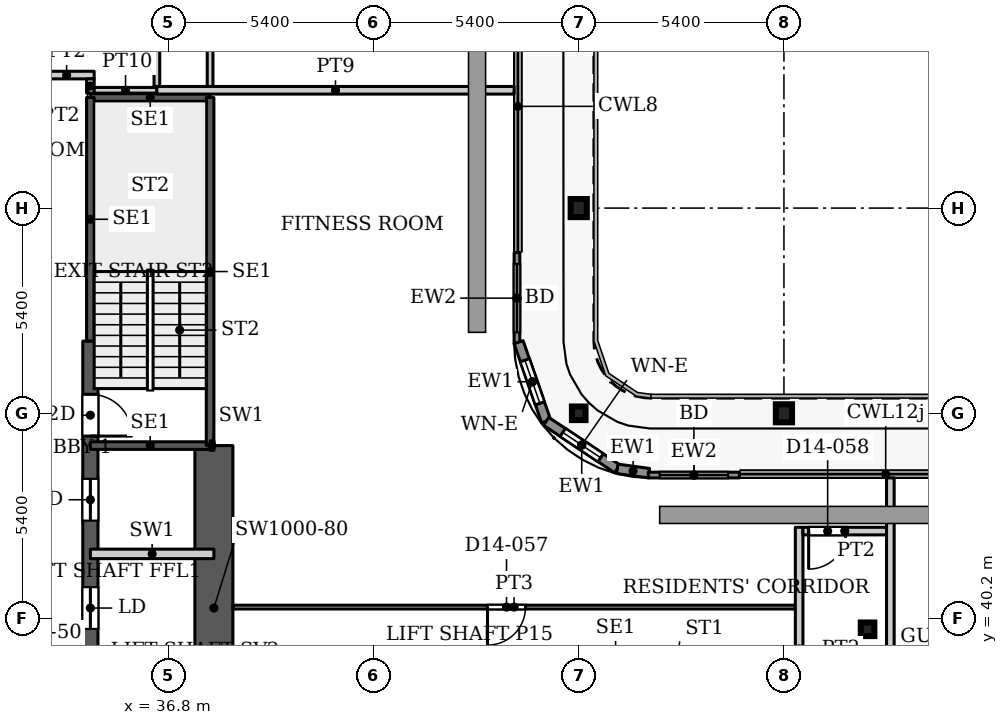
"""IFC4 building model, lengths in metres.
Left out: names, types, materials, properties, quantities, classifications, styles, units other than length and angle.
Written with IfcOpenShell. Run it as: python <this file> out.ifc"""

import sys

from ifc_helpers import new_model, si_unit, direction, frame, frame_2d, origin, origin_2d, place, context, subcontext, project, spatial, rectangle, hollow_rectangle, i_section, extrude, source, transform, mapped, element, fill, save


model = new_model("IFC4")
c1 = context("Model", 3, precision=1e-05, world=origin(), true_north=direction((0.0, 1.0)))
c2 = subcontext(c1, "Body", "Model", "MODEL_VIEW")
j1 = project(units=[si_unit("LENGTHUNIT", "METRE"), si_unit("PLANEANGLEUNIT", "RADIAN")], contexts=[c1])
p1 = place(None, origin())
s1 = spatial("IfcSite", under=j1, at=p1, CompositionType="ELEMENT")
p2 = place(p1, origin())
s2 = spatial("IfcBuilding", under=s1, at=p2, CompositionType="ELEMENT")
p3 = place(p2, frame((0.0, 0.0, 69.5)))
s3 = spatial("IfcBuildingStorey", under=s2, at=p3, CompositionType="ELEMENT", Elevation=69.5)
for number, where, z_axis, x_axis in (
    (1, (53.0, 45.6, 0.0), (0.0, 0.0, 1.0), (1.0, 0.0, 0.0)),
    (2, (47.6, 51.0, 0.0), (0.0, 0.0, 1.0), (1.0, 0.0, 0.0)),
):
    element("IfcColumn", number, at=place(p3, frame(where, z_axis=z_axis, x_axis=x_axis)), inside=s3, PredefinedType="COLUMN", context=c2, shape_type="SweptSolid", body=[
        extrude(i_section(OverallWidth=0.424, OverallDepth=0.474, WebThickness=0.048, FlangeThickness=0.077, FilletRadius=0.014, at=origin_2d()), origin(), (0.0, 0.0, 1.0), 3.9),
    ])
for number, where, z_axis, x_axis in (
    (3, (55.2, 39.916, 0.0), (0.0, 0.0, 1.0), (1.0, 0.0, 0.0)),
    (4, (47.6, 45.6, 0.0), (0.0, 0.0, 1.0), (1.0, 0.0, 0.0)),
):
    element("IfcColumn", number, at=place(p3, frame(where, z_axis=z_axis, x_axis=x_axis)), inside=s3, PredefinedType="COLUMN", context=c2, shape_type="SweptSolid", body=[
        extrude(hollow_rectangle(XDim=0.356, YDim=0.356, WallThickness=0.016, InnerFilletRadius=0.016, OuterFilletRadius=0.032, at=origin_2d()), origin(), (0.0, 0.0, 1.0), 3.9),
    ])
p4 = place(p3, frame((34.75, 29.05, 0.0), z_axis=(0.0, 0.0, 1.0), x_axis=(0.0, 1.0, 0.0)))
e5 = element("IfcWall", 5, at=p4, inside=s3, PredefinedType="SHEAR", context=c2, shape_type="SweptSolid", body=[
    extrude(rectangle(XDim=18.45, YDim=0.4, at=frame_2d((9.225, 0.0))), origin(), (0.0, 0.0, 1.0), 3.9),
])
p5 = place(p4, frame((8.025, 0.0, 0.0)))
e6 = element("IfcOpeningElement", 6, at=p5, cuts=e5, PredefinedType="OPENING", context=c2, shape_type="SweptSolid", body=[
    extrude(rectangle(XDim=1.1, YDim=2.2, at=frame_2d((0.55, 1.1))), frame((0.0, 0.21, 0.0), z_axis=(0.0, -1.0, 0.0), x_axis=(1.0, 0.0, 0.0)), (0.0, 0.0, 1.0), 0.42),
])
p6 = place(p4, frame((10.875, 0.0, 0.0)))
e7 = element("IfcOpeningElement", 7, at=p6, cuts=e5, PredefinedType="OPENING", context=c2, shape_type="SweptSolid", body=[
    extrude(rectangle(XDim=1.1, YDim=2.2, at=frame_2d((0.55, 1.1))), frame((0.0, 0.21, 0.0), z_axis=(0.0, -1.0, 0.0), x_axis=(1.0, 0.0, 0.0)), (0.0, 0.0, 1.0), 0.42),
])
p7 = place(p4, frame((13.725, 0.0, 0.0)))
e8 = element("IfcOpeningElement", 8, at=p7, cuts=e5, PredefinedType="OPENING", context=c2, shape_type="SweptSolid", body=[
    extrude(rectangle(XDim=1.1, YDim=2.2, at=frame_2d((0.55, 1.1))), frame((0.0, 0.21, 0.0), z_axis=(0.0, -1.0, 0.0), x_axis=(1.0, 0.0, 0.0)), (0.0, 0.0, 1.0), 0.42),
])
p8 = place(p4, frame((15.95, 0.0, 0.0)))
e9 = element("IfcOpeningElement", 9, at=p8, cuts=e5, PredefinedType="OPENING", context=c2, shape_type="SweptSolid", body=[
    extrude(rectangle(XDim=1.1, YDim=2.2, at=frame_2d((0.55, 1.1))), frame((0.0, 0.21, 0.0), z_axis=(0.0, -1.0, 0.0), x_axis=(1.0, 0.0, 0.0)), (0.0, 0.0, 1.0), 0.42),
])
p9 = place(p3, frame((38.0, 36.2, 0.0), z_axis=(0.0, 0.0, 1.0), x_axis=(0.0, 1.0, 0.0)))
e10 = element("IfcWall", 10, at=p9, inside=s3, PredefinedType="SHEAR", context=c2, shape_type="SweptSolid", body=[
    extrude(rectangle(XDim=8.55, YDim=1.0, at=frame_2d((4.275, 0.0))), origin(), (0.0, 0.0, 1.0), 3.9),
])
p10 = place(p3, frame((45.975, 49.83, 0.0), z_axis=(0.0, 0.0, 1.0), x_axis=(0.0, -1.0, 0.0)))
e11 = element("IfcWall", 11, at=p10, inside=s3, PredefinedType="SOLIDWALL", context=c2, shape_type="SweptSolid", body=[
    extrude(rectangle(XDim=2.4, YDim=0.15, at=frame_2d((1.2, 0.0))), origin(), (0.0, 0.0, 1.0), 3.75),
])
p11 = place(p10, frame((0.3, 0.0, 0.0)))
e12 = element("IfcOpeningElement", 12, at=p11, cuts=e11, PredefinedType="OPENING", context=c2, shape_type="SweptSolid", body=[
    extrude(rectangle(XDim=1.8, YDim=2.4, at=frame_2d((0.9, 1.2))), frame((0.0, 0.085, 0.0), z_axis=(0.0, -1.0, 0.0), x_axis=(1.0, 0.0, 0.0)), (0.0, 0.0, 1.0), 0.17),
])
p12 = place(p3, frame((46.018, 47.471, 0.0), z_axis=(0.0, 0.0, 1.0), x_axis=(0.328791208903, -0.944402637093, 0.0)))
e13 = element("IfcWall", 13, at=p12, inside=s3, PredefinedType="SOLIDWALL", context=c2, shape_type="SweptSolid", body=[
    extrude(rectangle(XDim=2.205, YDim=0.25, at=frame_2d((1.102, 0.0))), origin(), (0.0, 0.0, 1.0), 3.75),
])
p13 = place(p12, frame((0.503, 0.0, 0.6)))
e14 = element("IfcOpeningElement", 14, at=p13, cuts=e13, PredefinedType="OPENING", context=c2, shape_type="SweptSolid", body=[
    extrude(rectangle(XDim=1.2, YDim=2.1, at=frame_2d((0.6, 1.05))), frame((0.0, 0.135, 0.0), z_axis=(0.0, -1.0, 0.0), x_axis=(1.0, 0.0, 0.0)), (0.0, 0.0, 1.0), 0.27),
])
p14 = place(p3, frame((46.743, 45.389, 0.0), z_axis=(0.0, 0.0, 1.0), x_axis=(0.831449265529, -0.555600682912, 0.0)))
e15 = element("IfcWall", 15, at=p14, inside=s3, PredefinedType="SOLIDWALL", context=c2, shape_type="SweptSolid", body=[
    extrude(rectangle(XDim=2.251, YDim=0.25, at=frame_2d((1.126, 0.0))), origin(), (0.0, 0.0, 1.0), 3.75),
])
p15 = place(p14, frame((0.525, 0.0, 0.6)))
e16 = element("IfcOpeningElement", 16, at=p15, cuts=e15, PredefinedType="OPENING", context=c2, shape_type="SweptSolid", body=[
    extrude(rectangle(XDim=1.2, YDim=2.1, at=frame_2d((0.6, 1.05))), frame((0.0, 0.135, 0.0), z_axis=(0.0, -1.0, 0.0), x_axis=(1.0, 0.0, 0.0)), (0.0, 0.0, 1.0), 0.27),
])
p16 = place(p3, frame((48.615, 44.138, 0.0), z_axis=(0.0, 0.0, 1.0), x_axis=(0.990741504246, -0.135761819977, 0.0)))
e17 = element("IfcWall", 17, at=p16, inside=s3, PredefinedType="SOLIDWALL", context=c2, shape_type="SweptSolid", body=[
    extrude(rectangle(XDim=0.84, YDim=0.25, at=frame_2d((0.42, 0.0))), origin(), (0.0, 0.0, 1.0), 3.75),
])
p17 = place(p3, frame((49.43, 43.975, 0.0), z_axis=(0.0, 0.0, 1.0), x_axis=(1.0, 0.0, 0.0)))
e18 = element("IfcWall", 18, at=p17, inside=s3, PredefinedType="SOLIDWALL", context=c2, shape_type="SweptSolid", body=[
    extrude(rectangle(XDim=2.4, YDim=0.15, at=frame_2d((1.2, 0.0))), origin(), (0.0, 0.0, 1.0), 3.75),
])
p18 = place(p17, frame((0.3, 0.0, 0.0)))
e19 = element("IfcOpeningElement", 19, at=p18, cuts=e18, PredefinedType="OPENING", context=c2, shape_type="SweptSolid", body=[
    extrude(rectangle(XDim=1.8, YDim=2.4, at=frame_2d((0.9, 1.2))), frame((0.0, 0.085, 0.0), z_axis=(0.0, -1.0, 0.0), x_axis=(1.0, 0.0, 0.0)), (0.0, 0.0, 1.0), 0.17),
])
for number, where, z_axis, x_axis in (
    (20, (34.75, 44.75, 0.0), (0.0, 0.0, 1.0), (1.0, 0.0, 0.0)),
    (21, (34.75, 53.91, 0.0), (0.0, 0.0, 1.0), (1.0, 0.0, 0.0)),
):
    element("IfcWall", number, at=place(p3, frame(where, z_axis=z_axis, x_axis=x_axis)), inside=s3, PredefinedType="SHEAR", context=c2, shape_type="SweptSolid", body=[
        extrude(rectangle(XDim=3.15, YDim=0.2, at=frame_2d((1.575, 0.0))), origin(), (0.0, 0.0, 1.0), 3.9),
    ])
p19 = place(p3, frame((34.75, 47.5, 0.0), z_axis=(0.0, 0.0, 1.0), x_axis=(0.0, 1.0, 0.0)))
e22 = element("IfcWall", 22, at=p19, inside=s3, PredefinedType="SHEAR", context=c2, shape_type="SweptSolid", body=[
    extrude(rectangle(XDim=6.41, YDim=0.2, at=frame_2d((3.205, 0.0))), origin(), (0.0, 0.0, 1.0), 3.9),
])
p20 = place(p3, frame((37.9, 44.75, 0.0), z_axis=(0.0, 0.0, 1.0), x_axis=(0.0, 1.0, 0.0)))
e23 = element("IfcWall", 23, at=p20, inside=s3, PredefinedType="SHEAR", context=c2, shape_type="SweptSolid", body=[
    extrude(rectangle(XDim=9.16, YDim=0.2, at=frame_2d((4.58, 0.0))), origin(), (0.0, 0.0, 1.0), 3.9),
])
p21 = place(p3, frame((34.75, 41.9, 0.0), z_axis=(0.0, 0.0, 1.0), x_axis=(1.0, 0.0, 0.0)))
e24 = element("IfcWall", 24, at=p21, inside=s3, PredefinedType="PARTITIONING", context=c2, shape_type="SweptSolid", body=[
    extrude(rectangle(XDim=3.25, YDim=0.25, at=frame_2d((1.625, 0.0))), origin(), (0.0, 0.0, 1.0), 3.9),
])
p22 = place(p3, frame((37.9, 44.75, 0.0), z_axis=(0.0, 0.0, 1.0), x_axis=(1.0, 0.0, 0.0)))
e25 = element("IfcWall", 25, at=p22, inside=s3, PredefinedType="PARTITIONING", context=c2, shape_type="SweptSolid", body=[
    extrude(rectangle(XDim=0.1, YDim=0.25, at=frame_2d((0.05, 0.0))), origin(), (0.0, 0.0, 1.0), 3.9),
])
p23 = place(p3, frame((33.4, 54.5, 0.0), z_axis=(0.0, 0.0, 1.0), x_axis=(1.0, 0.0, 0.0)))
e26 = element("IfcWall", 26, at=p23, inside=s3, PredefinedType="PARTITIONING", context=c2, shape_type="SweptSolid", body=[
    extrude(rectangle(XDim=1.45, YDim=0.2, at=frame_2d((0.725, 0.0))), origin(), (0.0, 0.0, 1.0), 3.6),
])
p24 = place(p3, frame((34.75, 54.025, 0.0), z_axis=(0.0, 0.0, 1.0), x_axis=(0.0, 1.0, 0.0)))
e27 = element("IfcWall", 27, at=p24, inside=s3, PredefinedType="PARTITIONING", context=c2, shape_type="SweptSolid", body=[
    extrude(rectangle(XDim=0.375, YDim=0.2, at=frame_2d((0.188, 0.0))), origin(), (0.0, 0.0, 1.0), 3.6),
])
p25 = place(p3, frame((34.85, 54.1, 0.0), z_axis=(0.0, 0.0, 1.0), x_axis=(1.0, 0.0, 0.0)))
e28 = element("IfcWall", 28, at=p25, inside=s3, PredefinedType="PARTITIONING", context=c2, shape_type="SweptSolid", body=[
    extrude(rectangle(XDim=1.65, YDim=0.15, at=frame_2d((0.825, 0.0))), origin(), (0.0, 0.0, 1.0), 3.6),
])
p26 = place(p3, frame((36.5, 54.1, 0.0), z_axis=(0.0, 0.0, 1.0), x_axis=(1.0, 0.0, 0.0)))
e29 = element("IfcWall", 29, at=p26, inside=s3, PredefinedType="PARTITIONING", context=c2, shape_type="SweptSolid", body=[
    extrude(rectangle(XDim=9.4, YDim=0.2, at=frame_2d((4.7, 0.0))), origin(), (0.0, 0.0, 1.0), 3.6),
])
p27 = place(p3, frame((36.5, 54.2, 0.0), z_axis=(0.0, 0.0, 1.0), x_axis=(0.0, 1.0, 0.0)))
e30 = element("IfcWall", 30, at=p27, inside=s3, PredefinedType="PARTITIONING", context=c2, shape_type="SweptSolid", body=[
    extrude(rectangle(XDim=2.825, YDim=0.15, at=frame_2d((1.413, 0.0))), origin(), (0.0, 0.0, 1.0), 3.6),
])
p28 = place(p27, frame((1.0, 0.0, 0.0)))
e31 = element("IfcOpeningElement", 31, at=p28, cuts=e30, PredefinedType="OPENING", context=c2, shape_type="SweptSolid", body=[
    extrude(rectangle(XDim=0.8, YDim=2.1, at=frame_2d((0.4, 1.05))), frame((0.0, 0.085, 0.0), z_axis=(0.0, -1.0, 0.0), x_axis=(1.0, 0.0, 0.0)), (0.0, 0.0, 1.0), 0.17),
])
p29 = place(p3, frame((37.9, 54.2, 0.0), z_axis=(0.0, 0.0, 1.0), x_axis=(0.0, 1.0, 0.0)))
e32 = element("IfcWall", 32, at=p29, inside=s3, PredefinedType="PARTITIONING", context=c2, shape_type="SweptSolid", body=[
    extrude(rectangle(XDim=25.05, YDim=0.15, at=frame_2d((12.525, 0.0))), origin(), (0.0, 0.0, 1.0), 3.6),
])
p30 = place(p29, frame((5.6, 0.0, 0.0)))
e33 = element("IfcOpeningElement", 33, at=p30, cuts=e32, PredefinedType="OPENING", context=c2, shape_type="SweptSolid", body=[
    extrude(rectangle(XDim=0.9, YDim=2.1, at=frame_2d((0.45, 1.05))), frame((0.0, 0.085, 0.0), z_axis=(0.0, -1.0, 0.0), x_axis=(1.0, 0.0, 0.0)), (0.0, 0.0, 1.0), 0.17),
])
p31 = place(p29, frame((14.9, 0.0, 0.0)))
e34 = element("IfcOpeningElement", 34, at=p31, cuts=e32, PredefinedType="OPENING", context=c2, shape_type="SweptSolid", body=[
    extrude(rectangle(XDim=0.9, YDim=2.1, at=frame_2d((0.45, 1.05))), frame((0.0, 0.085, 0.0), z_axis=(0.0, -1.0, 0.0), x_axis=(1.0, 0.0, 0.0)), (0.0, 0.0, 1.0), 0.17),
])
p32 = place(p29, frame((18.65, 0.0, 0.0)))
e35 = element("IfcOpeningElement", 35, at=p32, cuts=e32, PredefinedType="OPENING", context=c2, shape_type="SweptSolid", body=[
    extrude(rectangle(XDim=0.9, YDim=2.1, at=frame_2d((0.45, 1.05))), frame((0.0, 0.085, 0.0), z_axis=(0.0, -1.0, 0.0), x_axis=(1.0, 0.0, 0.0)), (0.0, 0.0, 1.0), 0.17),
])
p33 = place(p29, frame((22.5, 0.0, 0.0)))
e36 = element("IfcOpeningElement", 36, at=p33, cuts=e32, PredefinedType="OPENING", context=c2, shape_type="SweptSolid", body=[
    extrude(rectangle(XDim=1.0, YDim=2.1, at=frame_2d((0.5, 1.05))), frame((0.0, 0.085, 0.0), z_axis=(0.0, -1.0, 0.0), x_axis=(1.0, 0.0, 0.0)), (0.0, 0.0, 1.0), 0.17),
])
p34 = place(p29, frame((1.2, 0.0, 0.0)))
e37 = element("IfcOpeningElement", 37, at=p34, cuts=e32, PredefinedType="OPENING", context=c2, shape_type="SweptSolid", body=[
    extrude(rectangle(XDim=1.6, YDim=2.1, at=frame_2d((0.8, 1.05))), frame((0.0, 0.085, 0.0), z_axis=(0.0, -1.0, 0.0), x_axis=(1.0, 0.0, 0.0)), (0.0, 0.0, 1.0), 0.17),
])
p35 = place(p29, frame((11.3, 0.0, 0.0)))
e38 = element("IfcOpeningElement", 38, at=p35, cuts=e32, PredefinedType="OPENING", context=c2, shape_type="SweptSolid", body=[
    extrude(rectangle(XDim=0.9, YDim=2.1, at=frame_2d((0.45, 1.05))), frame((0.0, 0.085, 0.0), z_axis=(0.0, -1.0, 0.0), x_axis=(1.0, 0.0, 0.0)), (0.0, 0.0, 1.0), 0.17),
])
p36 = place(p3, frame((38.499, 40.5, 0.0), z_axis=(0.0, 0.0, 1.0), x_axis=(1.0, 0.0, 0.0)))
e39 = element("IfcWall", 39, at=p36, inside=s3, PredefinedType="PARTITIONING", context=c2, shape_type="SweptSolid", body=[
    extrude(rectangle(XDim=14.801, YDim=0.1, at=frame_2d((7.4, 0.0))), origin(), (0.0, 0.0, 1.0), 3.6),
])
p37 = place(p36, frame((6.701, 0.0, 0.0)))
e40 = element("IfcOpeningElement", 40, at=p37, cuts=e39, PredefinedType="OPENING", context=c2, shape_type="SweptSolid", body=[
    extrude(rectangle(XDim=1.0, YDim=2.1, at=frame_2d((0.5, 1.05))), frame((0.0, 0.06, 0.0), z_axis=(0.0, -1.0, 0.0), x_axis=(1.0, 0.0, 0.0)), (0.0, 0.0, 1.0), 0.12),
])
p38 = place(p3, frame((53.4, 36.199, 0.0), z_axis=(0.0, 0.0, 1.0), x_axis=(0.0, 1.0, 0.0)))
e41 = element("IfcWall", 41, at=p38, inside=s3, PredefinedType="PARTITIONING", context=c2, shape_type="SweptSolid", body=[
    extrude(rectangle(XDim=6.401, YDim=0.2, at=frame_2d((3.201, 0.0))), origin(), (0.0, 0.0, 1.0), 3.6),
])
p39 = place(p3, frame((53.5, 42.5, 0.0), z_axis=(0.0, 0.0, 1.0), x_axis=(1.0, 0.0, 0.0)))
e42 = element("IfcWall", 42, at=p39, inside=s3, PredefinedType="PARTITIONING", context=c2, shape_type="SweptSolid", body=[
    extrude(rectangle(XDim=2.2, YDim=0.2, at=frame_2d((1.1, 0.0))), origin(), (0.0, 0.0, 1.0), 3.6),
])
p40 = place(p39, frame((0.15, 0.0, 0.0)))
e43 = element("IfcOpeningElement", 43, at=p40, cuts=e42, PredefinedType="OPENING", context=c2, shape_type="SweptSolid", body=[
    extrude(rectangle(XDim=1.0, YDim=2.1, at=frame_2d((0.5, 1.05))), frame((0.0, 0.11, 0.0), z_axis=(0.0, -1.0, 0.0), x_axis=(1.0, 0.0, 0.0)), (0.0, 0.0, 1.0), 0.22),
])
p41 = place(p3, frame((55.8, 30.4, 0.0), z_axis=(0.0, 0.0, 1.0), x_axis=(0.0, 1.0, 0.0)))
e44 = element("IfcWall", 44, at=p41, inside=s3, PredefinedType="PARTITIONING", context=c2, shape_type="SweptSolid", body=[
    extrude(rectangle(XDim=13.5, YDim=0.2, at=frame_2d((6.75, 0.0))), origin(), (0.0, 0.0, 1.0), 3.6),
])
m1 = source(origin(), c2, "Body", "SweptSolid", [
    extrude(rectangle(XDim=1.8, YDim=2.4, at=frame_2d((0.9, 1.2))), frame((0.0, 0.025, 0.0), z_axis=(0.0, -1.0, 0.0), x_axis=(1.0, 0.0, 0.0)), (0.0, 0.0, 1.0), 0.05),
])
p42 = place(p11, origin())
e45 = element("IfcDoor", 45, at=p42, inside=s3, OperationType="SLIDING_TO_LEFT", PredefinedType="DOOR", context=c2, shape_type="MappedRepresentation", body=[
    mapped(m1, transform((0.0, 0.0, 0.0), x_axis=(1.0, 0.0, 0.0), y_axis=(0.0, 1.0, 0.0), z_axis=(0.0, 0.0, 1.0), scale=1.0)),
])
fill(e12, e45)
m2 = source(origin(), c2, "Body", "SweptSolid", [
    extrude(rectangle(XDim=1.2, YDim=2.1, at=frame_2d((0.6, 1.05))), frame((0.0, 0.03, 0.0), z_axis=(0.0, -1.0, 0.0), x_axis=(1.0, 0.0, 0.0)), (0.0, 0.0, 1.0), 0.06),
])
p43 = place(p13, origin())
e46 = element("IfcWindow", 46, at=p43, inside=s3, PartitioningType="SINGLE_PANEL", PredefinedType="WINDOW", context=c2, shape_type="MappedRepresentation", body=[
    mapped(m2, transform((0.0, 0.0, 0.0), x_axis=(1.0, 0.0, 0.0), y_axis=(0.0, 1.0, 0.0), z_axis=(0.0, 0.0, 1.0), scale=1.0)),
])
fill(e14, e46)
p44 = place(p15, origin())
e47 = element("IfcWindow", 47, at=p44, inside=s3, PartitioningType="SINGLE_PANEL", PredefinedType="WINDOW", context=c2, shape_type="MappedRepresentation", body=[
    mapped(m2, transform((0.0, 0.0, 0.0), x_axis=(1.0, 0.0, 0.0), y_axis=(0.0, 1.0, 0.0), z_axis=(0.0, 0.0, 1.0), scale=1.0)),
])
fill(e16, e47)
p45 = place(p18, origin())
e48 = element("IfcDoor", 48, at=p45, inside=s3, OperationType="SLIDING_TO_LEFT", PredefinedType="DOOR", context=c2, shape_type="MappedRepresentation", body=[
    mapped(m1, transform((0.0, 0.0, 0.0), x_axis=(1.0, 0.0, 0.0), y_axis=(0.0, 1.0, 0.0), z_axis=(0.0, 0.0, 1.0), scale=1.0)),
])
fill(e19, e48)
m3 = source(origin(), c2, "Body", "SweptSolid", [
    extrude(rectangle(XDim=1.1, YDim=2.2, at=frame_2d((0.55, 1.1))), frame((0.0, 0.025, 0.0), z_axis=(0.0, -1.0, 0.0), x_axis=(1.0, 0.0, 0.0)), (0.0, 0.0, 1.0), 0.05),
])
p46 = place(p6, origin())
e49 = element("IfcDoor", 49, at=p46, inside=s3, OperationType="SLIDING_TO_LEFT", PredefinedType="DOOR", context=c2, shape_type="MappedRepresentation", body=[
    mapped(m3, transform((0.0, 0.0, 0.0), x_axis=(1.0, 0.0, 0.0), y_axis=(0.0, 1.0, 0.0), z_axis=(0.0, 0.0, 1.0), scale=1.0)),
])
fill(e7, e49)
p47 = place(p7, origin())
e50 = element("IfcDoor", 50, at=p47, inside=s3, OperationType="SLIDING_TO_LEFT", PredefinedType="DOOR", context=c2, shape_type="MappedRepresentation", body=[
    mapped(m3, transform((0.0, 0.0, 0.0), x_axis=(1.0, 0.0, 0.0), y_axis=(0.0, 1.0, 0.0), z_axis=(0.0, 0.0, 1.0), scale=1.0)),
])
fill(e8, e50)
m4 = source(origin(), c2, "Body", "SweptSolid", [
    extrude(rectangle(XDim=1.1, YDim=2.2, at=frame_2d((0.55, 1.1))), frame((0.0, 0.025, 0.0), z_axis=(0.0, -1.0, 0.0), x_axis=(1.0, 0.0, 0.0)), (0.0, 0.0, 1.0), 0.05),
])
p48 = place(p8, origin())
e51 = element("IfcDoor", 51, at=p48, inside=s3, OperationType="SINGLE_SWING_RIGHT", PredefinedType="DOOR", context=c2, shape_type="MappedRepresentation", body=[
    mapped(m4, transform((0.0, 0.0, 0.0), x_axis=(1.0, 0.0, 0.0), y_axis=(0.0, 1.0, 0.0), z_axis=(0.0, 0.0, 1.0), scale=1.0)),
])
fill(e9, e51)
m5 = source(origin(), c2, "Body", "SweptSolid", [
    extrude(rectangle(XDim=1.0, YDim=2.1, at=frame_2d((0.5, 1.05))), frame((0.0, 0.025, 0.0), z_axis=(0.0, -1.0, 0.0), x_axis=(1.0, 0.0, 0.0)), (0.0, 0.0, 1.0), 0.05),
])
p49 = place(p37, origin())
e52 = element("IfcDoor", 52, at=p49, inside=s3, OperationType="SINGLE_SWING_RIGHT", PredefinedType="DOOR", context=c2, shape_type="MappedRepresentation", body=[
    mapped(m5, transform((0.0, 0.0, 0.0), x_axis=(1.0, 0.0, 0.0), y_axis=(0.0, 1.0, 0.0), z_axis=(0.0, 0.0, 1.0), scale=1.0)),
])
fill(e40, e52)
m6 = source(origin(), c2, "Body", "SweptSolid", [
    extrude(rectangle(XDim=1.0, YDim=2.1, at=frame_2d((0.5, 1.05))), frame((0.0, 0.025, 0.0), z_axis=(0.0, -1.0, 0.0), x_axis=(1.0, 0.0, 0.0)), (0.0, 0.0, 1.0), 0.05),
])
p50 = place(p40, origin())
e53 = element("IfcDoor", 53, at=p50, inside=s3, OperationType="SINGLE_SWING_RIGHT", PredefinedType="DOOR", context=c2, shape_type="MappedRepresentation", body=[
    mapped(m6, transform((0.0, 0.0, 0.0), x_axis=(1.0, 0.0, 0.0), y_axis=(0.0, 1.0, 0.0), z_axis=(0.0, 0.0, 1.0), scale=1.0)),
])
fill(e43, e53)
save(model, sys.argv[1])
